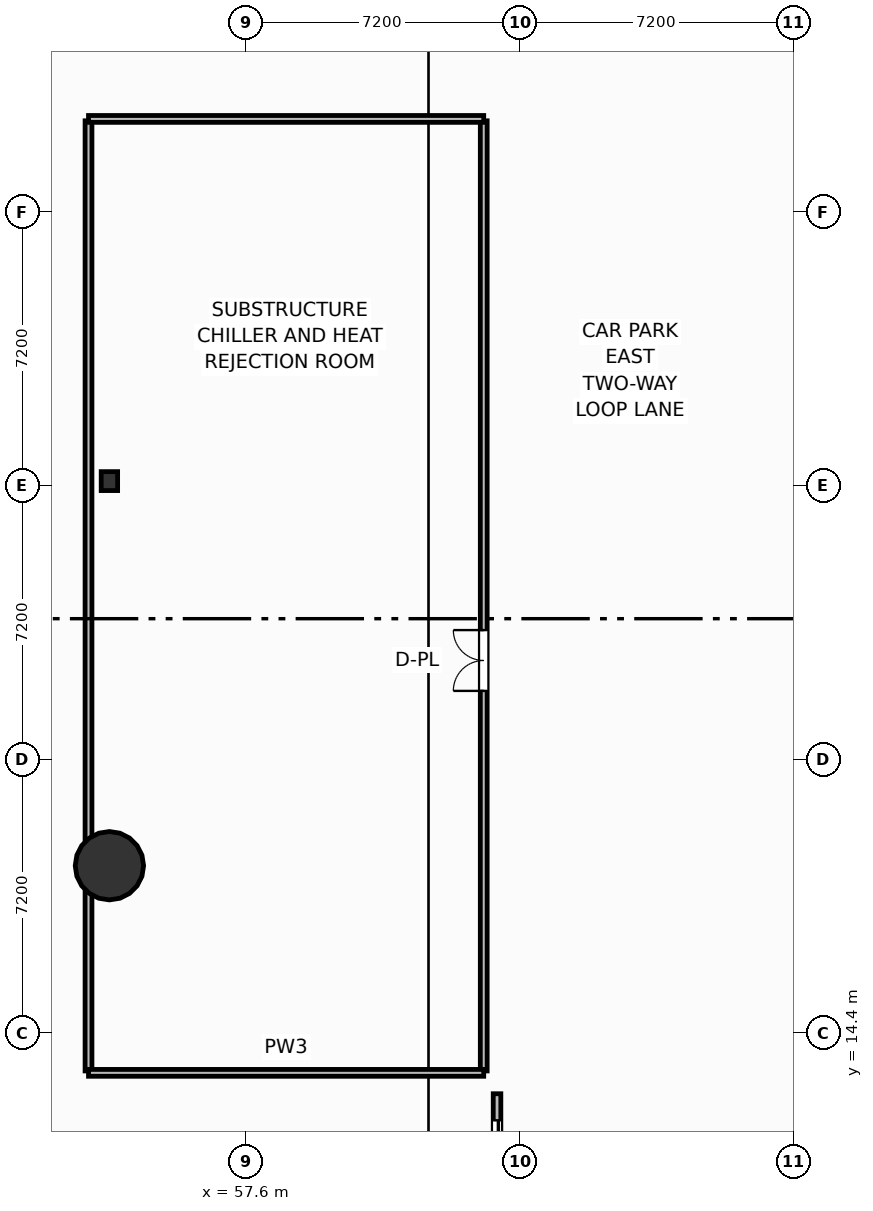
"""IFC4 building model, lengths in metres.
Left out: names, types, materials, properties, quantities, classifications, styles, units other than length and angle.
Written with IfcOpenShell. Run it as: python <this file> out.ifc"""

import sys

from ifc_helpers import new_model, si_unit, direction, frame, frame_2d, origin, origin_2d, place, context, subcontext, project, spatial, rectangle, circle, i_section, extrude, element, fill, save


model = new_model("IFC4")
c1 = context("Model", 3, precision=1e-05, world=origin(), true_north=direction((0.0, 1.0)))
c2 = subcontext(c1, "Body", "Model", "MODEL_VIEW")
j1 = project(units=[si_unit("LENGTHUNIT", "METRE"), si_unit("PLANEANGLEUNIT", "RADIAN")], contexts=[c1])
p1 = place(None, origin())
s1 = spatial("IfcSite", under=j1, at=p1, CompositionType="ELEMENT")
p2 = place(p1, origin())
s2 = spatial("IfcBuilding", under=s1, at=p2, CompositionType="ELEMENT")
p3 = place(p2, frame((0.0, 0.0, -9.0)))
s3 = spatial("IfcBuildingStorey", under=s2, at=p3, CompositionType="ELEMENT", Elevation=-9.0)
p4 = place(p3, frame((54.0, 28.92, 0.0), z_axis=(0.0, 0.0, 1.0), x_axis=(1.0, 0.0, 0.0)))
e1 = element("IfcColumn", 1, at=p4, inside=s3, PredefinedType="COLUMN", context=c2, shape_type="SweptSolid", body=[
    extrude(i_section(OverallWidth=0.432, OverallDepth=0.498, WebThickness=0.056, FlangeThickness=0.089, FilletRadius=0.025, at=origin_2d()), origin(), (0.0, 0.0, 1.0), 4.5),
])
p5 = place(p3, frame((54.0, 18.8, 0.0), z_axis=(0.0, 0.0, 1.0), x_axis=(1.0, 0.0, 0.0)))
e2 = element("IfcColumn", 2, at=p5, inside=s3, PredefinedType="COLUMN", context=c2, shape_type="SweptSolid", body=[
    extrude(circle(Radius=0.9, at=origin_2d()), origin(), (0.0, 0.0, 1.0), 4.5),
])
p6 = place(p3, frame((64.2, 6.2, 0.0), z_axis=(0.0, 0.0, 1.0), x_axis=(0.0, 1.0, 0.0)))
e3 = element("IfcWall", 3, at=p6, inside=s3, PredefinedType="PARTITIONING", context=c2, shape_type="SweptSolid", body=[
    extrude(rectangle(XDim=6.6, YDim=0.2, at=frame_2d((3.3, 0.0))), origin(), (0.0, 0.0, 1.0), 4.2),
])
p7 = place(p6, frame((0.7, 0.0, 0.0)))
e4 = element("IfcOpeningElement", 4, at=p7, cuts=e3, PredefinedType="OPENING", context=c2, shape_type="SweptSolid", body=[
    extrude(rectangle(XDim=5.2, YDim=2.8, at=frame_2d((2.6, 1.4))), frame((0.0, 0.11, 0.0), z_axis=(0.0, -1.0, 0.0), x_axis=(1.0, 0.0, 0.0)), (0.0, 0.0, 1.0), 0.22),
])
p8 = place(p3, frame((63.85, 13.4, 0.0), z_axis=(0.0, 0.0, 1.0), x_axis=(0.0, 1.0, 0.0)))
e5 = element("IfcWall", 5, at=p8, inside=s3, PredefinedType="PARTITIONING", context=c2, shape_type="SweptSolid", body=[
    extrude(rectangle(XDim=25.0, YDim=0.18, at=frame_2d((12.5, 0.0))), origin(), (0.0, 0.0, 1.0), 4.2),
])
p9 = place(p8, frame((10.0, 0.0, 0.0)))
e6 = element("IfcOpeningElement", 6, at=p9, cuts=e5, PredefinedType="OPENING", context=c2, shape_type="SweptSolid", body=[
    extrude(rectangle(XDim=1.6, YDim=2.05, at=frame_2d((0.8, 1.025))), frame((0.0, 0.1, 0.0), z_axis=(0.0, -1.0, 0.0), x_axis=(1.0, 0.0, 0.0)), (0.0, 0.0, 1.0), 0.2),
])
p10 = place(p3, frame((53.45, 13.4, 0.0), z_axis=(0.0, 0.0, 1.0), x_axis=(0.0, 1.0, 0.0)))
e7 = element("IfcWall", 7, at=p10, inside=s3, PredefinedType="PARTITIONING", context=c2, shape_type="SweptSolid", body=[
    extrude(rectangle(XDim=25.0, YDim=0.18, at=frame_2d((12.5, 0.0))), origin(), (0.0, 0.0, 1.0), 4.2),
])
p11 = place(p3, frame((53.45, 13.35, 0.0), z_axis=(0.0, 0.0, 1.0), x_axis=(1.0, 0.0, 0.0)))
e8 = element("IfcWall", 8, at=p11, inside=s3, PredefinedType="PARTITIONING", context=c2, shape_type="SweptSolid", body=[
    extrude(rectangle(XDim=10.4, YDim=0.18, at=frame_2d((5.2, 0.0))), origin(), (0.0, 0.0, 1.0), 4.2),
])
p12 = place(p3, frame((53.45, 38.45, 0.0), z_axis=(0.0, 0.0, 1.0), x_axis=(1.0, 0.0, 0.0)))
e9 = element("IfcWall", 9, at=p12, inside=s3, PredefinedType="PARTITIONING", context=c2, shape_type="SweptSolid", body=[
    extrude(rectangle(XDim=10.4, YDim=0.18, at=frame_2d((5.2, 0.0))), origin(), (0.0, 0.0, 1.0), 3.165),
])
p13 = place(p7, origin())
e10 = element("IfcDoor", 10, at=p13, inside=s3, OperationType="SLIDING_TO_LEFT", PredefinedType="GATE", context=c2, shape_type="SweptSolid", body=[
    extrude(rectangle(XDim=5.2, YDim=2.8, at=frame_2d((2.6, 1.4))), frame((0.0, 0.025, 0.0), z_axis=(0.0, -1.0, 0.0), x_axis=(1.0, 0.0, 0.0)), (0.0, 0.0, 1.0), 0.05),
])
fill(e4, e10)
p14 = place(p9, origin())
e11 = element("IfcDoor", 11, at=p14, inside=s3, OperationType="DOUBLE_DOOR_SINGLE_SWING", PredefinedType="DOOR", context=c2, shape_type="SweptSolid", body=[
    extrude(rectangle(XDim=1.6, YDim=2.05, at=frame_2d((0.8, 1.025))), frame((0.0, 0.025, 0.0), z_axis=(0.0, -1.0, 0.0), x_axis=(1.0, 0.0, 0.0)), (0.0, 0.0, 1.0), 0.05),
])
fill(e6, e11)
save(model, sys.argv[1])
